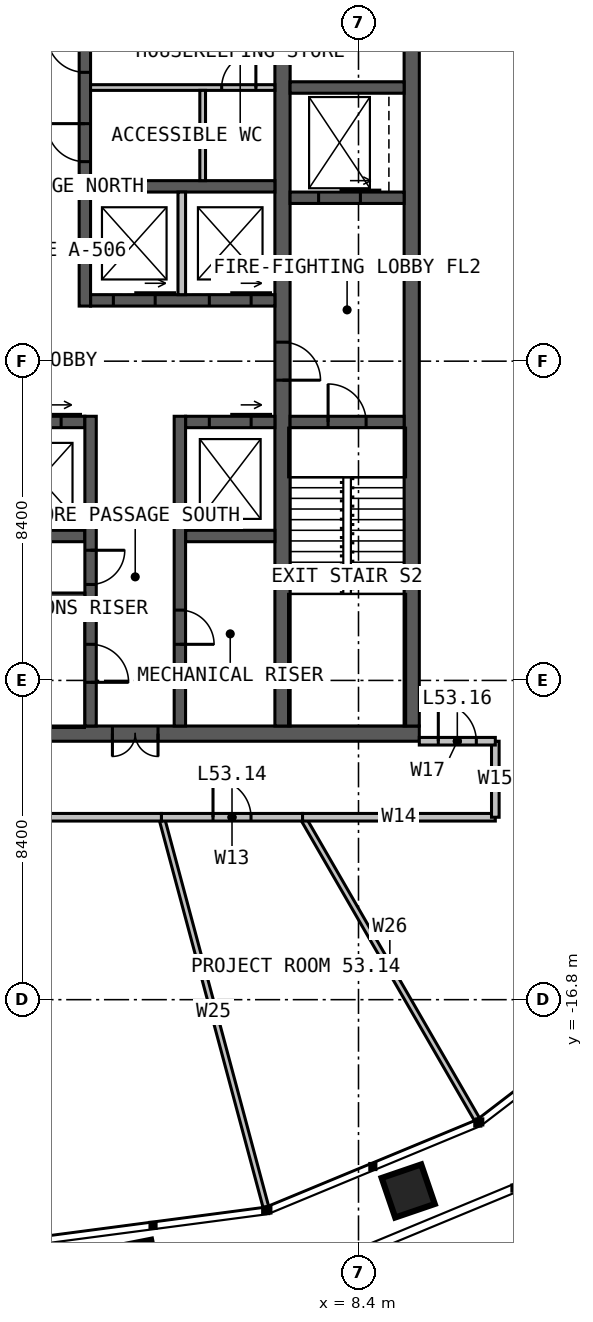
"""IFC4 building model, lengths in metres.
Left out: names, types, materials, properties, quantities, classifications, styles, units other than length and angle.
Written with IfcOpenShell. Run it as: python <this file> out.ifc"""

import sys

from ifc_helpers import new_model, si_unit, direction, frame, frame_2d, origin, place, context, subcontext, project, spatial, rectangle, extrude, element, fill, save


model = new_model("IFC4")
c1 = context("Model", 3, precision=1e-05, world=origin(), true_north=direction((0.0, 1.0)))
c2 = subcontext(c1, "Body", "Model", "MODEL_VIEW")
j1 = project(units=[si_unit("LENGTHUNIT", "METRE"), si_unit("PLANEANGLEUNIT", "RADIAN")], contexts=[c1])
p1 = place(None, origin())
s1 = spatial("IfcSite", under=j1, at=p1, CompositionType="ELEMENT")
p2 = place(p1, origin())
s2 = spatial("IfcBuilding", under=s1, at=p2, CompositionType="ELEMENT")
p3 = place(p2, frame((0.0, 0.0, 220.0)))
s3 = spatial("IfcBuildingStorey", under=s2, at=p3, CompositionType="ELEMENT", Elevation=220.0)
p4 = place(p3, frame((10.0, -9.8, 0.0), z_axis=(0.0, 0.0, 1.0), x_axis=(-1.0, 0.0, 0.0)))
e1 = element("IfcWall", 1, at=p4, inside=s3, PredefinedType="SOLIDWALL", context=c2, shape_type="SweptSolid", body=[
    extrude(rectangle(XDim=20.0, YDim=0.4, at=frame_2d((10.0, 0.0))), origin(), (0.0, 0.0, 1.0), 4.0),
])
p5 = place(p4, frame((6.875, 0.0, 0.0)))
e2 = element("IfcOpeningElement", 2, at=p5, cuts=e1, PredefinedType="OPENING", context=c2, shape_type="SweptSolid", body=[
    extrude(rectangle(XDim=1.2, YDim=2.2, at=frame_2d((0.6, 1.1))), frame((0.0, 0.21, 0.0), z_axis=(0.0, -1.0, 0.0), x_axis=(1.0, 0.0, 0.0)), (0.0, 0.0, 1.0), 0.42),
])
p6 = place(p3, frame((9.8, -9.6, 0.0), z_axis=(0.0, 0.0, 1.0), x_axis=(0.0, 1.0, 0.0)))
e3 = element("IfcWall", 3, at=p6, inside=s3, PredefinedType="SOLIDWALL", context=c2, shape_type="SweptSolid", body=[
    extrude(rectangle(XDim=19.2, YDim=0.4, at=frame_2d((9.6, 0.0))), origin(), (0.0, 0.0, 1.0), 4.0),
])
p7 = place(p3, frame((6.4, 9.6, 0.0), z_axis=(0.0, 0.0, 1.0), x_axis=(0.0, -1.0, 0.0)))
e4 = element("IfcWall", 4, at=p7, inside=s3, PredefinedType="SOLIDWALL", context=c2, shape_type="SweptSolid", body=[
    extrude(rectangle(XDim=19.2, YDim=0.4, at=frame_2d((9.6, 0.0))), origin(), (0.0, 0.0, 1.0), 4.0),
])
p8 = place(p7, frame((9.1, 0.0, 0.0)))
e5 = element("IfcOpeningElement", 5, at=p8, cuts=e4, PredefinedType="OPENING", context=c2, shape_type="SweptSolid", body=[
    extrude(rectangle(XDim=1.0, YDim=2.2, at=frame_2d((0.5, 1.1))), frame((0.0, 0.21, 0.0), z_axis=(0.0, -1.0, 0.0), x_axis=(1.0, 0.0, 0.0)), (0.0, 0.0, 1.0), 0.42),
])
p9 = place(p3, frame((1.35, 1.6, 0.0), z_axis=(0.0, 0.0, 1.0), x_axis=(1.0, 0.0, 0.0)))
e6 = element("IfcWall", 6, at=p9, inside=s3, PredefinedType="SOLIDWALL", context=c2, shape_type="SweptSolid", body=[
    extrude(rectangle(XDim=4.85, YDim=0.3, at=frame_2d((2.425, 0.0))), origin(), (0.0, 0.0, 1.0), 4.0),
])
p10 = place(p9, frame((0.6, 0.0, 0.0)))
e7 = element("IfcOpeningElement", 7, at=p10, cuts=e6, PredefinedType="OPENING", context=c2, shape_type="SweptSolid", body=[
    extrude(rectangle(XDim=1.1, YDim=2.2, at=frame_2d((0.55, 1.1))), frame((0.0, 0.16, 0.0), z_axis=(0.0, -1.0, 0.0), x_axis=(1.0, 0.0, 0.0)), (0.0, 0.0, 1.0), 0.32),
])
p11 = place(p9, frame((3.125, 0.0, 0.0)))
e8 = element("IfcOpeningElement", 8, at=p11, cuts=e6, PredefinedType="OPENING", context=c2, shape_type="SweptSolid", body=[
    extrude(rectangle(XDim=1.1, YDim=2.2, at=frame_2d((0.55, 1.1))), frame((0.0, 0.16, 0.0), z_axis=(0.0, -1.0, 0.0), x_axis=(1.0, 0.0, 0.0)), (0.0, 0.0, 1.0), 0.32),
])
p12 = place(p3, frame((1.35, 4.6, 0.0), z_axis=(0.0, 0.0, 1.0), x_axis=(1.0, 0.0, 0.0)))
e9 = element("IfcWall", 9, at=p12, inside=s3, PredefinedType="SOLIDWALL", context=c2, shape_type="SweptSolid", body=[
    extrude(rectangle(XDim=4.85, YDim=0.3, at=frame_2d((2.425, 0.0))), origin(), (0.0, 0.0, 1.0), 4.0),
])
p13 = place(p3, frame((1.2, 1.45, 0.0), z_axis=(0.0, 0.0, 1.0), x_axis=(0.0, 1.0, 0.0)))
e10 = element("IfcWall", 10, at=p13, inside=s3, PredefinedType="SOLIDWALL", context=c2, shape_type="SweptSolid", body=[
    extrude(rectangle(XDim=8.15, YDim=0.3, at=frame_2d((4.075, 0.0))), origin(), (0.0, 0.0, 1.0), 4.0),
])
p14 = place(p13, frame((3.8, 0.0, 0.0)))
e11 = element("IfcOpeningElement", 11, at=p14, cuts=e10, PredefinedType="OPENING", context=c2, shape_type="SweptSolid", body=[
    extrude(rectangle(XDim=1.0, YDim=2.2, at=frame_2d((0.5, 1.1))), frame((0.0, 0.16, 0.0), z_axis=(0.0, -1.0, 0.0), x_axis=(1.0, 0.0, 0.0)), (0.0, 0.0, 1.0), 0.32),
])
p15 = place(p13, frame((6.15, 0.0, 0.0)))
e12 = element("IfcOpeningElement", 12, at=p15, cuts=e10, PredefinedType="OPENING", context=c2, shape_type="SweptSolid", body=[
    extrude(rectangle(XDim=1.0, YDim=2.2, at=frame_2d((0.5, 1.1))), frame((0.0, 0.16, 0.0), z_axis=(0.0, -1.0, 0.0), x_axis=(1.0, 0.0, 0.0)), (0.0, 0.0, 1.0), 0.32),
])
p16 = place(p3, frame((-6.2, -1.6, 0.0), z_axis=(0.0, 0.0, 1.0), x_axis=(1.0, 0.0, 0.0)))
e13 = element("IfcWall", 13, at=p16, inside=s3, PredefinedType="SOLIDWALL", context=c2, shape_type="SweptSolid", body=[
    extrude(rectangle(XDim=7.4, YDim=0.3, at=frame_2d((3.7, 0.0))), origin(), (0.0, 0.0, 1.0), 4.0),
])
p17 = place(p16, frame((0.625, 0.0, 0.0)))
e14 = element("IfcOpeningElement", 14, at=p17, cuts=e13, PredefinedType="OPENING", context=c2, shape_type="SweptSolid", body=[
    extrude(rectangle(XDim=1.1, YDim=2.2, at=frame_2d((0.55, 1.1))), frame((0.0, 0.16, 0.0), z_axis=(0.0, -1.0, 0.0), x_axis=(1.0, 0.0, 0.0)), (0.0, 0.0, 1.0), 0.32),
])
p18 = place(p16, frame((3.15, 0.0, 0.0)))
e15 = element("IfcOpeningElement", 15, at=p18, cuts=e13, PredefinedType="OPENING", context=c2, shape_type="SweptSolid", body=[
    extrude(rectangle(XDim=1.1, YDim=2.2, at=frame_2d((0.55, 1.1))), frame((0.0, 0.16, 0.0), z_axis=(0.0, -1.0, 0.0), x_axis=(1.0, 0.0, 0.0)), (0.0, 0.0, 1.0), 0.32),
])
p19 = place(p16, frame((5.675, 0.0, 0.0)))
e16 = element("IfcOpeningElement", 16, at=p19, cuts=e13, PredefinedType="OPENING", context=c2, shape_type="SweptSolid", body=[
    extrude(rectangle(XDim=1.1, YDim=2.2, at=frame_2d((0.55, 1.1))), frame((0.0, 0.16, 0.0), z_axis=(0.0, -1.0, 0.0), x_axis=(1.0, 0.0, 0.0)), (0.0, 0.0, 1.0), 0.32),
])
p20 = place(p3, frame((3.85, -1.6, 0.0), z_axis=(0.0, 0.0, 1.0), x_axis=(1.0, 0.0, 0.0)))
e17 = element("IfcWall", 17, at=p20, inside=s3, PredefinedType="SOLIDWALL", context=c2, shape_type="SweptSolid", body=[
    extrude(rectangle(XDim=2.35, YDim=0.3, at=frame_2d((1.175, 0.0))), origin(), (0.0, 0.0, 1.0), 4.0),
])
p21 = place(p20, frame((0.625, 0.0, 0.0)))
e18 = element("IfcOpeningElement", 18, at=p21, cuts=e17, PredefinedType="OPENING", context=c2, shape_type="SweptSolid", body=[
    extrude(rectangle(XDim=1.1, YDim=2.2, at=frame_2d((0.55, 1.1))), frame((0.0, 0.16, 0.0), z_axis=(0.0, -1.0, 0.0), x_axis=(1.0, 0.0, 0.0)), (0.0, 0.0, 1.0), 0.32),
])
p22 = place(p3, frame((-6.2, -4.6, 0.0), z_axis=(0.0, 0.0, 1.0), x_axis=(1.0, 0.0, 0.0)))
e19 = element("IfcWall", 19, at=p22, inside=s3, PredefinedType="SOLIDWALL", context=c2, shape_type="SweptSolid", body=[
    extrude(rectangle(XDim=7.4, YDim=0.3, at=frame_2d((3.7, 0.0))), origin(), (0.0, 0.0, 1.0), 4.0),
])
p23 = place(p3, frame((3.85, -4.6, 0.0), z_axis=(0.0, 0.0, 1.0), x_axis=(1.0, 0.0, 0.0)))
e20 = element("IfcWall", 20, at=p23, inside=s3, PredefinedType="SOLIDWALL", context=c2, shape_type="SweptSolid", body=[
    extrude(rectangle(XDim=2.35, YDim=0.3, at=frame_2d((1.175, 0.0))), origin(), (0.0, 0.0, 1.0), 4.0),
])
p24 = place(p3, frame((1.35, -1.45, 0.0), z_axis=(0.0, 0.0, 1.0), x_axis=(0.0, -1.0, 0.0)))
e21 = element("IfcWall", 21, at=p24, inside=s3, PredefinedType="SOLIDWALL", context=c2, shape_type="SweptSolid", body=[
    extrude(rectangle(XDim=8.15, YDim=0.3, at=frame_2d((4.075, 0.0))), origin(), (0.0, 0.0, 1.0), 4.0),
])
p25 = place(p24, frame((6.0, 0.0, 0.0)))
e22 = element("IfcOpeningElement", 22, at=p25, cuts=e21, PredefinedType="OPENING", context=c2, shape_type="SweptSolid", body=[
    extrude(rectangle(XDim=1.0, YDim=2.2, at=frame_2d((0.5, 1.1))), frame((0.0, 0.16, 0.0), z_axis=(0.0, -1.0, 0.0), x_axis=(1.0, 0.0, 0.0)), (0.0, 0.0, 1.0), 0.32),
])
p26 = place(p24, frame((3.525, 0.0, 0.0)))
e23 = element("IfcOpeningElement", 23, at=p26, cuts=e21, PredefinedType="OPENING", context=c2, shape_type="SweptSolid", body=[
    extrude(rectangle(XDim=0.9, YDim=2.2, at=frame_2d((0.45, 1.1))), frame((0.0, 0.16, 0.0), z_axis=(0.0, -1.0, 0.0), x_axis=(1.0, 0.0, 0.0)), (0.0, 0.0, 1.0), 0.32),
])
p27 = place(p3, frame((3.7, -1.45, 0.0), z_axis=(0.0, 0.0, 1.0), x_axis=(0.0, -1.0, 0.0)))
e24 = element("IfcWall", 24, at=p27, inside=s3, PredefinedType="SOLIDWALL", context=c2, shape_type="SweptSolid", body=[
    extrude(rectangle(XDim=8.15, YDim=0.3, at=frame_2d((4.075, 0.0))), origin(), (0.0, 0.0, 1.0), 4.0),
])
p28 = place(p27, frame((5.1, 0.0, 0.0)))
e25 = element("IfcOpeningElement", 25, at=p28, cuts=e24, PredefinedType="OPENING", context=c2, shape_type="SweptSolid", body=[
    extrude(rectangle(XDim=0.9, YDim=2.2, at=frame_2d((0.45, 1.1))), frame((0.0, 0.16, 0.0), z_axis=(0.0, -1.0, 0.0), x_axis=(1.0, 0.0, 0.0)), (0.0, 0.0, 1.0), 0.32),
])
p29 = place(p3, frame((-6.2, -6.2, 0.0), z_axis=(0.0, 0.0, 1.0), x_axis=(1.0, 0.0, 0.0)))
e26 = element("IfcWall", 26, at=p29, inside=s3, PredefinedType="SOLIDWALL", context=c2, shape_type="SweptSolid", body=[
    extrude(rectangle(XDim=7.4, YDim=0.2, at=frame_2d((3.7, 0.0))), origin(), (0.0, 0.0, 1.0), 4.0),
])
p30 = place(p3, frame((6.6, -1.6, 0.0), z_axis=(0.0, 0.0, 1.0), x_axis=(1.0, 0.0, 0.0)))
e27 = element("IfcWall", 27, at=p30, inside=s3, PredefinedType="SOLIDWALL", context=c2, shape_type="SweptSolid", body=[
    extrude(rectangle(XDim=3.0, YDim=0.3, at=frame_2d((1.5, 0.0))), origin(), (0.0, 0.0, 1.0), 4.0),
])
p31 = place(p30, frame((1.0, 0.0, 0.0)))
e28 = element("IfcOpeningElement", 28, at=p31, cuts=e27, PredefinedType="OPENING", context=c2, shape_type="SweptSolid", body=[
    extrude(rectangle(XDim=1.0, YDim=2.2, at=frame_2d((0.5, 1.1))), frame((0.0, 0.16, 0.0), z_axis=(0.0, -1.0, 0.0), x_axis=(1.0, 0.0, 0.0)), (0.0, 0.0, 1.0), 0.32),
])
p32 = place(p3, frame((6.6, 4.3, 0.0), z_axis=(0.0, 0.0, 1.0), x_axis=(1.0, 0.0, 0.0)))
e29 = element("IfcWall", 29, at=p32, inside=s3, PredefinedType="SOLIDWALL", context=c2, shape_type="SweptSolid", body=[
    extrude(rectangle(XDim=3.0, YDim=0.3, at=frame_2d((1.5, 0.0))), origin(), (0.0, 0.0, 1.0), 4.0),
])
p33 = place(p32, frame((0.75, 0.0, 0.0)))
e30 = element("IfcOpeningElement", 30, at=p33, cuts=e29, PredefinedType="OPENING", context=c2, shape_type="SweptSolid", body=[
    extrude(rectangle(XDim=1.1, YDim=2.2, at=frame_2d((0.55, 1.1))), frame((0.0, 0.16, 0.0), z_axis=(0.0, -1.0, 0.0), x_axis=(1.0, 0.0, 0.0)), (0.0, 0.0, 1.0), 0.32),
])
p34 = place(p3, frame((6.6, 7.2, 0.0), z_axis=(0.0, 0.0, 1.0), x_axis=(1.0, 0.0, 0.0)))
e31 = element("IfcWall", 31, at=p34, inside=s3, PredefinedType="SOLIDWALL", context=c2, shape_type="SweptSolid", body=[
    extrude(rectangle(XDim=3.0, YDim=0.3, at=frame_2d((1.5, 0.0))), origin(), (0.0, 0.0, 1.0), 4.0),
])
p35 = place(p3, frame((3.75, 1.75, 0.0), z_axis=(0.0, 0.0, 1.0), x_axis=(0.0, 1.0, 0.0)))
e32 = element("IfcWall", 32, at=p35, inside=s3, PredefinedType="SOLIDWALL", context=c2, shape_type="SweptSolid", body=[
    extrude(rectangle(XDim=2.7, YDim=0.2, at=frame_2d((1.35, 0.0))), origin(), (0.0, 0.0, 1.0), 3.75),
])
p36 = place(p3, frame((1.35, 7.2, 0.0), z_axis=(0.0, 0.0, 1.0), x_axis=(1.0, 0.0, 0.0)))
e33 = element("IfcWall", 33, at=p36, inside=s3, PredefinedType="PARTITIONING", context=c2, shape_type="SweptSolid", body=[
    extrude(rectangle(XDim=4.85, YDim=0.15, at=frame_2d((2.425, 0.0))), origin(), (0.0, 0.0, 1.0), 3.75),
])
p37 = place(p36, frame((3.45, 0.0, 0.0)))
e34 = element("IfcOpeningElement", 34, at=p37, cuts=e33, PredefinedType="OPENING", context=c2, shape_type="SweptSolid", body=[
    extrude(rectangle(XDim=0.9, YDim=2.2, at=frame_2d((0.45, 1.1))), frame((0.0, 0.085, 0.0), z_axis=(0.0, -1.0, 0.0), x_axis=(1.0, 0.0, 0.0)), (0.0, 0.0, 1.0), 0.17),
])
p38 = place(p3, frame((4.3, 4.75, 0.0), z_axis=(0.0, 0.0, 1.0), x_axis=(0.0, 1.0, 0.0)))
e35 = element("IfcWall", 35, at=p38, inside=s3, PredefinedType="PARTITIONING", context=c2, shape_type="SweptSolid", body=[
    extrude(rectangle(XDim=2.375, YDim=0.15, at=frame_2d((1.188, 0.0))), origin(), (0.0, 0.0, 1.0), 3.75),
])
p39 = place(p3, frame((3.215, -12.0, 0.0), z_axis=(0.0, 0.0, 1.0), x_axis=(0.258831459304, -0.965922499828, 0.0)))
e36 = element("IfcWall", 36, at=p39, inside=s3, PredefinedType="PARTITIONING", context=c2, shape_type="SweptSolid", body=[
    extrude(rectangle(XDim=10.62, YDim=0.15, at=frame_2d((5.31, 0.0))), origin(), (0.0, 0.0, 1.0), 2.89),
])
p40 = place(p3, frame((6.928, -12.0, 0.0), z_axis=(0.0, 0.0, 1.0), x_axis=(0.500006167237, -0.866021843099, 0.0)))
e37 = element("IfcWall", 37, at=p40, inside=s3, PredefinedType="PARTITIONING", context=c2, shape_type="SweptSolid", body=[
    extrude(rectangle(XDim=9.187, YDim=0.15, at=frame_2d((4.594, 0.0))), origin(), (0.0, 0.0, 1.0), 2.89),
])
p41 = place(p3, frame((-6.928, -12.0, 0.0), z_axis=(0.0, 0.0, 1.0), x_axis=(1.0, 0.0, 0.0)))
e38 = element("IfcWall", 38, at=p41, inside=s3, PredefinedType="PARTITIONING", context=c2, shape_type="SweptSolid", body=[
    extrude(rectangle(XDim=10.144, YDim=0.2, at=frame_2d((5.072, 0.0))), origin(), (0.0, 0.0, 1.0), 3.8),
])
p42 = place(p41, frame((4.172, 0.0, 0.0)))
e39 = element("IfcOpeningElement", 39, at=p42, cuts=e38, PredefinedType="OPENING", context=c2, shape_type="SweptSolid", body=[
    extrude(rectangle(XDim=1.8, YDim=2.2, at=frame_2d((0.9, 1.1))), frame((0.0, 0.11, 0.0), z_axis=(0.0, -1.0, 0.0), x_axis=(1.0, 0.0, 0.0)), (0.0, 0.0, 1.0), 0.22),
])
p43 = place(p3, frame((3.215, -12.0, 0.0), z_axis=(0.0, 0.0, 1.0), x_axis=(1.0, 0.0, 0.0)))
e40 = element("IfcWall", 40, at=p43, inside=s3, PredefinedType="PARTITIONING", context=c2, shape_type="SweptSolid", body=[
    extrude(rectangle(XDim=3.713, YDim=0.2, at=frame_2d((1.856, 0.0))), origin(), (0.0, 0.0, 1.0), 3.8),
])
p44 = place(p43, frame((1.356, 0.0, 0.0)))
e41 = element("IfcOpeningElement", 41, at=p44, cuts=e40, PredefinedType="OPENING", context=c2, shape_type="SweptSolid", body=[
    extrude(rectangle(XDim=1.0, YDim=2.2, at=frame_2d((0.5, 1.1))), frame((0.0, 0.11, 0.0), z_axis=(0.0, -1.0, 0.0), x_axis=(1.0, 0.0, 0.0)), (0.0, 0.0, 1.0), 0.22),
])
p45 = place(p3, frame((6.928, -12.0, 0.0), z_axis=(0.0, 0.0, 1.0), x_axis=(1.0, 0.0, 0.0)))
e42 = element("IfcWall", 42, at=p45, inside=s3, PredefinedType="PARTITIONING", context=c2, shape_type="SweptSolid", body=[
    extrude(rectangle(XDim=5.072, YDim=0.2, at=frame_2d((2.536, 0.0))), origin(), (0.0, 0.0, 1.0), 3.8),
])
p46 = place(p3, frame((12.0, -12.0, 0.0), z_axis=(0.0, 0.0, 1.0), x_axis=(0.0, 1.0, 0.0)))
e43 = element("IfcWall", 43, at=p46, inside=s3, PredefinedType="PARTITIONING", context=c2, shape_type="SweptSolid", body=[
    extrude(rectangle(XDim=2.0, YDim=0.2, at=frame_2d((1.0, 0.0))), origin(), (0.0, 0.0, 1.0), 3.8),
])
p47 = place(p3, frame((10.0, -10.0, 0.0), z_axis=(0.0, 0.0, 1.0), x_axis=(1.0, 0.0, 0.0)))
e44 = element("IfcWall", 44, at=p47, inside=s3, PredefinedType="PARTITIONING", context=c2, shape_type="SweptSolid", body=[
    extrude(rectangle(XDim=2.0, YDim=0.2, at=frame_2d((1.0, 0.0))), origin(), (0.0, 0.0, 1.0), 3.8),
])
p48 = place(p47, frame((0.5, 0.0, 0.0)))
e45 = element("IfcOpeningElement", 45, at=p48, cuts=e44, PredefinedType="OPENING", context=c2, shape_type="SweptSolid", body=[
    extrude(rectangle(XDim=1.0, YDim=2.2, at=frame_2d((0.5, 1.1))), frame((0.0, 0.11, 0.0), z_axis=(0.0, -1.0, 0.0), x_axis=(1.0, 0.0, 0.0)), (0.0, 0.0, 1.0), 0.22),
])
p49 = place(p5, origin())
e46 = element("IfcDoor", 46, at=p49, inside=s3, OperationType="DOUBLE_DOOR_SINGLE_SWING", PredefinedType="DOOR", context=c2, shape_type="SweptSolid", body=[
    extrude(rectangle(XDim=1.2, YDim=2.2, at=frame_2d((0.6, 1.1))), frame((0.0, 0.025, 0.0), z_axis=(0.0, -1.0, 0.0), x_axis=(1.0, 0.0, 0.0)), (0.0, 0.0, 1.0), 0.05),
])
fill(e2, e46)
p50 = place(p8, origin())
e47 = element("IfcDoor", 47, at=p50, inside=s3, OperationType="SINGLE_SWING_RIGHT", PredefinedType="DOOR", context=c2, shape_type="SweptSolid", body=[
    extrude(rectangle(XDim=1.0, YDim=2.2, at=frame_2d((0.5, 1.1))), frame((0.0, 0.025, 0.0), z_axis=(0.0, -1.0, 0.0), x_axis=(1.0, 0.0, 0.0)), (0.0, 0.0, 1.0), 0.05),
])
fill(e5, e47)
p51 = place(p31, origin())
e48 = element("IfcDoor", 48, at=p51, inside=s3, OperationType="SINGLE_SWING_LEFT", PredefinedType="DOOR", context=c2, shape_type="SweptSolid", body=[
    extrude(rectangle(XDim=1.0, YDim=2.2, at=frame_2d((0.5, 1.1))), frame((0.0, 0.025, 0.0), z_axis=(0.0, -1.0, 0.0), x_axis=(1.0, 0.0, 0.0)), (0.0, 0.0, 1.0), 0.05),
])
fill(e28, e48)
p52 = place(p25, origin())
e49 = element("IfcDoor", 49, at=p52, inside=s3, OperationType="SINGLE_SWING_RIGHT", PredefinedType="DOOR", context=c2, shape_type="SweptSolid", body=[
    extrude(rectangle(XDim=1.0, YDim=2.2, at=frame_2d((0.5, 1.1))), frame((0.0, 0.025, 0.0), z_axis=(0.0, -1.0, 0.0), x_axis=(1.0, 0.0, 0.0)), (0.0, 0.0, 1.0), 0.05),
])
fill(e22, e49)
p53 = place(p14, origin())
e50 = element("IfcDoor", 50, at=p53, inside=s3, OperationType="SINGLE_SWING_RIGHT", PredefinedType="DOOR", context=c2, shape_type="SweptSolid", body=[
    extrude(rectangle(XDim=1.0, YDim=2.2, at=frame_2d((0.5, 1.1))), frame((0.0, 0.025, 0.0), z_axis=(0.0, -1.0, 0.0), x_axis=(1.0, 0.0, 0.0)), (0.0, 0.0, 1.0), 0.05),
])
fill(e11, e50)
p54 = place(p15, origin())
e51 = element("IfcDoor", 51, at=p54, inside=s3, OperationType="SINGLE_SWING_RIGHT", PredefinedType="DOOR", context=c2, shape_type="SweptSolid", body=[
    extrude(rectangle(XDim=1.0, YDim=2.2, at=frame_2d((0.5, 1.1))), frame((0.0, 0.025, 0.0), z_axis=(0.0, -1.0, 0.0), x_axis=(1.0, 0.0, 0.0)), (0.0, 0.0, 1.0), 0.05),
])
fill(e12, e51)
p55 = place(p26, origin())
e52 = element("IfcDoor", 52, at=p55, inside=s3, OperationType="SINGLE_SWING_LEFT", PredefinedType="DOOR", context=c2, shape_type="SweptSolid", body=[
    extrude(rectangle(XDim=0.9, YDim=2.2, at=frame_2d((0.45, 1.1))), frame((0.0, 0.025, 0.0), z_axis=(0.0, -1.0, 0.0), x_axis=(1.0, 0.0, 0.0)), (0.0, 0.0, 1.0), 0.05),
])
fill(e23, e52)
p56 = place(p28, origin())
e53 = element("IfcDoor", 53, at=p56, inside=s3, OperationType="SINGLE_SWING_RIGHT", PredefinedType="DOOR", context=c2, shape_type="SweptSolid", body=[
    extrude(rectangle(XDim=0.9, YDim=2.2, at=frame_2d((0.45, 1.1))), frame((0.0, 0.025, 0.0), z_axis=(0.0, -1.0, 0.0), x_axis=(1.0, 0.0, 0.0)), (0.0, 0.0, 1.0), 0.05),
])
fill(e25, e53)
p57 = place(p37, origin())
e54 = element("IfcDoor", 54, at=p57, inside=s3, OperationType="SINGLE_SWING_RIGHT", PredefinedType="DOOR", context=c2, shape_type="SweptSolid", body=[
    extrude(rectangle(XDim=0.9, YDim=2.2, at=frame_2d((0.45, 1.1))), frame((0.0, 0.025, 0.0), z_axis=(0.0, -1.0, 0.0), x_axis=(1.0, 0.0, 0.0)), (0.0, 0.0, 1.0), 0.05),
])
fill(e34, e54)
p58 = place(p10, origin())
e55 = element("IfcDoor", 55, at=p58, inside=s3, OperationType="SLIDING_TO_LEFT", PredefinedType="DOOR", context=c2, shape_type="SweptSolid", body=[
    extrude(rectangle(XDim=1.1, YDim=2.2, at=frame_2d((0.55, 1.1))), frame((0.0, 0.025, 0.0), z_axis=(0.0, -1.0, 0.0), x_axis=(1.0, 0.0, 0.0)), (0.0, 0.0, 1.0), 0.05),
])
fill(e7, e55)
p59 = place(p11, origin())
e56 = element("IfcDoor", 56, at=p59, inside=s3, OperationType="SLIDING_TO_LEFT", PredefinedType="DOOR", context=c2, shape_type="SweptSolid", body=[
    extrude(rectangle(XDim=1.1, YDim=2.2, at=frame_2d((0.55, 1.1))), frame((0.0, 0.025, 0.0), z_axis=(0.0, -1.0, 0.0), x_axis=(1.0, 0.0, 0.0)), (0.0, 0.0, 1.0), 0.05),
])
fill(e8, e56)
p60 = place(p19, origin())
e57 = element("IfcDoor", 57, at=p60, inside=s3, OperationType="SLIDING_TO_LEFT", PredefinedType="DOOR", context=c2, shape_type="SweptSolid", body=[
    extrude(rectangle(XDim=1.1, YDim=2.2, at=frame_2d((0.55, 1.1))), frame((0.0, 0.025, 0.0), z_axis=(0.0, -1.0, 0.0), x_axis=(1.0, 0.0, 0.0)), (0.0, 0.0, 1.0), 0.05),
])
fill(e16, e57)
p61 = place(p21, origin())
e58 = element("IfcDoor", 58, at=p61, inside=s3, OperationType="SLIDING_TO_LEFT", PredefinedType="DOOR", context=c2, shape_type="SweptSolid", body=[
    extrude(rectangle(XDim=1.1, YDim=2.2, at=frame_2d((0.55, 1.1))), frame((0.0, 0.025, 0.0), z_axis=(0.0, -1.0, 0.0), x_axis=(1.0, 0.0, 0.0)), (0.0, 0.0, 1.0), 0.05),
])
fill(e18, e58)
p62 = place(p33, origin())
e59 = element("IfcDoor", 59, at=p62, inside=s3, OperationType="SLIDING_TO_LEFT", PredefinedType="DOOR", context=c2, shape_type="SweptSolid", body=[
    extrude(rectangle(XDim=1.1, YDim=2.2, at=frame_2d((0.55, 1.1))), frame((0.0, 0.025, 0.0), z_axis=(0.0, -1.0, 0.0), x_axis=(1.0, 0.0, 0.0)), (0.0, 0.0, 1.0), 0.05),
])
fill(e30, e59)
p63 = place(p44, origin())
e60 = element("IfcDoor", 60, at=p63, inside=s3, OperationType="SINGLE_SWING_LEFT", PredefinedType="DOOR", context=c2, shape_type="SweptSolid", body=[
    extrude(rectangle(XDim=1.0, YDim=2.2, at=frame_2d((0.5, 1.1))), frame((0.0, 0.025, 0.0), z_axis=(0.0, -1.0, 0.0), x_axis=(1.0, 0.0, 0.0)), (0.0, 0.0, 1.0), 0.05),
])
fill(e41, e60)
p64 = place(p48, origin())
e61 = element("IfcDoor", 61, at=p64, inside=s3, OperationType="SINGLE_SWING_LEFT", PredefinedType="DOOR", context=c2, shape_type="SweptSolid", body=[
    extrude(rectangle(XDim=1.0, YDim=2.2, at=frame_2d((0.5, 1.1))), frame((0.0, 0.025, 0.0), z_axis=(0.0, -1.0, 0.0), x_axis=(1.0, 0.0, 0.0)), (0.0, 0.0, 1.0), 0.05),
])
fill(e45, e61)
save(model, sys.argv[1])
